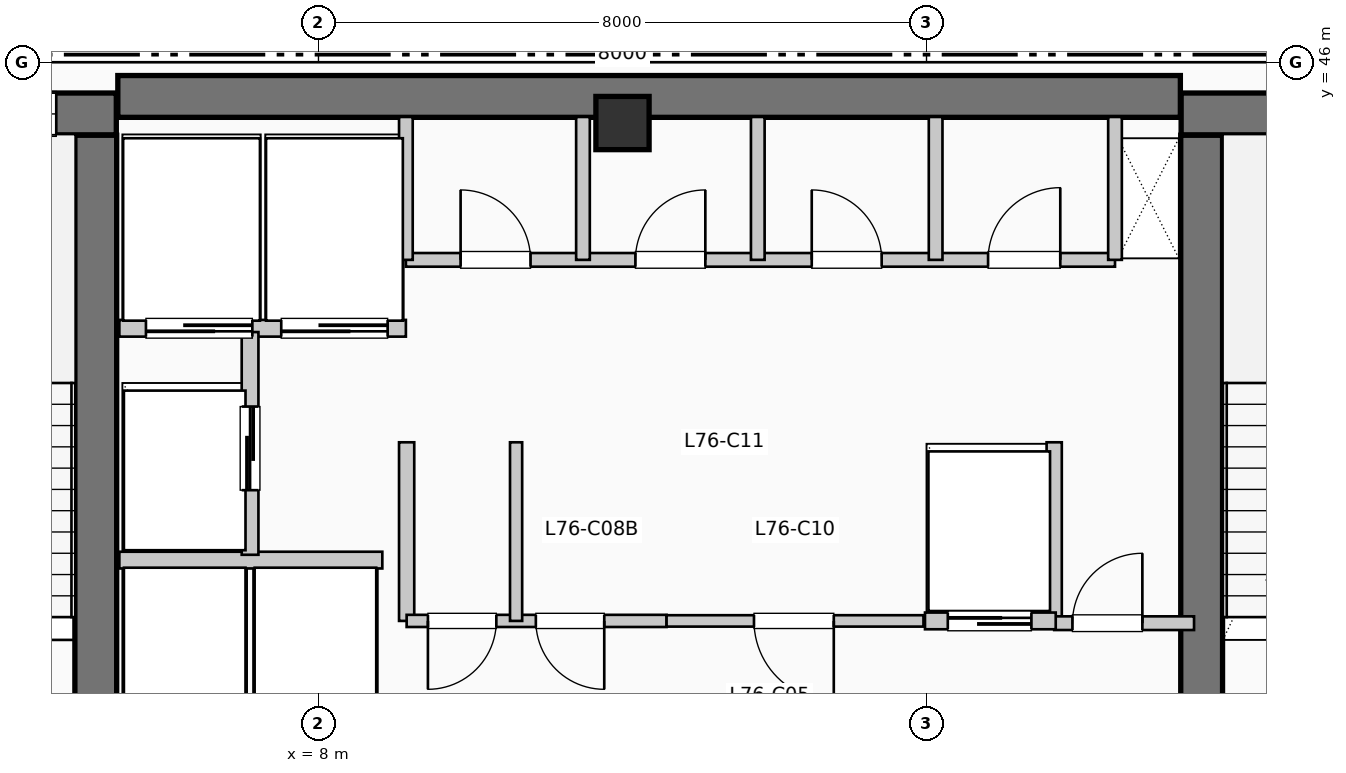
"""IFC4 building model, lengths in metres.
Left out: names, types, materials, properties, quantities, classifications, styles, units other than length and angle.
Written with IfcOpenShell. Run it as: python <this file> out.ifc"""

import sys

from ifc_helpers import new_model, si_unit, direction, frame, frame_2d, origin, origin_2d, place, context, subcontext, project, spatial, rectangle, extrude, element, fill, save


model = new_model("IFC4")
c1 = context("Model", 3, precision=1e-05, world=origin(), true_north=direction((0.0, 1.0)))
c2 = subcontext(c1, "Body", "Model", "MODEL_VIEW")
j1 = project(units=[si_unit("LENGTHUNIT", "METRE"), si_unit("PLANEANGLEUNIT", "RADIAN")], contexts=[c1])
p1 = place(None, origin())
s1 = spatial("IfcSite", under=j1, at=p1, CompositionType="ELEMENT")
p2 = place(p1, origin())
s2 = spatial("IfcBuilding", under=s1, at=p2, CompositionType="ELEMENT")
p3 = place(p2, frame((0.0, 0.0, 311.85)))
s3 = spatial("IfcBuildingStorey", under=s2, at=p3, CompositionType="ELEMENT", Elevation=311.85)
p4 = place(p3, frame((5.36, 45.55, 0.0), z_axis=(0.0, 0.0, 1.0), x_axis=(1.0, 0.0, 0.0)))
e1 = element("IfcWall", 1, at=p4, inside=s3, PredefinedType="SHEAR", context=c2, shape_type="SweptSolid", body=[
    extrude(rectangle(XDim=13.98, YDim=0.55, at=frame_2d((6.99, 0.0))), origin(), (0.0, 0.0, 1.0), 3.96),
])
p5 = place(p3, frame((5.07, 37.15, 0.0), z_axis=(0.0, 0.0, 1.0), x_axis=(0.0, 1.0, 0.0)))
e2 = element("IfcWall", 2, at=p5, inside=s3, PredefinedType="SHEAR", context=c2, shape_type="SweptSolid", body=[
    extrude(rectangle(XDim=7.89, YDim=0.55, at=frame_2d((3.945, 0.0))), origin(), (0.0, 0.0, 1.0), 3.96),
])
p6 = place(p3, frame((1.1, 45.32, 0.0), z_axis=(0.0, 0.0, 1.0), x_axis=(1.0, 0.0, 0.0)))
e3 = element("IfcWall", 3, at=p6, inside=s3, PredefinedType="SHEAR", context=c2, shape_type="SweptSolid", body=[
    extrude(rectangle(XDim=4.24, YDim=0.55, at=frame_2d((2.12, 0.0))), origin(), (0.0, 0.0, 1.0), 3.96),
])
p7 = place(p6, frame((2.05, 0.0, 1.05)))
e4 = element("IfcOpeningElement", 4, at=p7, cuts=e3, PredefinedType="OPENING", context=c2, shape_type="SweptSolid", body=[
    extrude(rectangle(XDim=1.4, YDim=1.8, at=frame_2d((0.7, 0.9))), frame((0.0, 0.285, 0.0), z_axis=(0.0, -1.0, 0.0), x_axis=(1.0, 0.0, 0.0)), (0.0, 0.0, 1.0), 0.57),
])
p8 = place(p3, frame((19.62, 37.15, 0.0), z_axis=(0.0, 0.0, 1.0), x_axis=(0.0, 1.0, 0.0)))
e5 = element("IfcWall", 5, at=p8, inside=s3, PredefinedType="SHEAR", context=c2, shape_type="SweptSolid", body=[
    extrude(rectangle(XDim=7.89, YDim=0.55, at=frame_2d((3.945, 0.0))), origin(), (0.0, 0.0, 1.0), 3.96),
])
p9 = place(p3, frame((19.35, 45.32, 0.0), z_axis=(0.0, 0.0, 1.0), x_axis=(1.0, 0.0, 0.0)))
e6 = element("IfcWall", 6, at=p9, inside=s3, PredefinedType="SHEAR", context=c2, shape_type="SweptSolid", body=[
    extrude(rectangle(XDim=3.69, YDim=0.55, at=frame_2d((1.845, 0.0))), origin(), (0.0, 0.0, 1.0), 3.96),
])
p10 = place(p9, frame((1.15, 0.0, 1.05)))
e7 = element("IfcOpeningElement", 7, at=p10, cuts=e6, PredefinedType="OPENING", context=c2, shape_type="SweptSolid", body=[
    extrude(rectangle(XDim=1.4, YDim=1.8, at=frame_2d((0.7, 0.9))), frame((0.0, 0.285, 0.0), z_axis=(0.0, -1.0, 0.0), x_axis=(1.0, 0.0, 0.0)), (0.0, 0.0, 1.0), 0.57),
])
p11 = place(p3, frame((12.0, 45.2, 0.0), z_axis=(0.0, 0.0, 1.0), x_axis=(1.0, 0.0, 0.0)))
e8 = element("IfcColumn", 8, at=p11, inside=s3, PredefinedType="COLUMN", context=c2, shape_type="SweptSolid", body=[
    extrude(rectangle(XDim=0.7, YDim=0.7, at=origin_2d()), origin(), (0.0, 0.0, 1.0), 3.96),
])
p12 = place(p3, frame((5.38, 39.45, 0.0), z_axis=(0.0, 0.0, 1.0), x_axis=(1.0, 0.0, 0.0)))
e9 = element("IfcWall", 9, at=p12, inside=s3, PredefinedType="PARTITIONING", context=c2, shape_type="SweptSolid", body=[
    extrude(rectangle(XDim=3.46, YDim=0.22, at=frame_2d((1.73, 0.0))), origin(), (0.0, 0.0, 1.0), 3.74),
])
p13 = place(p3, frame((5.38, 42.5, 0.0), z_axis=(0.0, 0.0, 1.0), x_axis=(1.0, 0.0, 0.0)))
e10 = element("IfcWall", 10, at=p13, inside=s3, PredefinedType="PARTITIONING", context=c2, shape_type="SweptSolid", body=[
    extrude(rectangle(XDim=3.77, YDim=0.22, at=frame_2d((1.885, 0.0))), origin(), (0.0, 0.0, 1.0), 3.74),
])
p14 = place(p13, frame((1.75, 0.0, 0.0), z_axis=(0.0, 0.0, 1.0), x_axis=(-1.0, 0.0, 0.0)))
e11 = element("IfcOpeningElement", 11, at=p14, cuts=e10, PredefinedType="OPENING", context=c2, shape_type="SweptSolid", body=[
    extrude(rectangle(XDim=1.4, YDim=2.2, at=frame_2d((0.7, 1.1))), frame((0.0, 0.12, 0.0), z_axis=(0.0, -1.0, 0.0), x_axis=(1.0, 0.0, 0.0)), (0.0, 0.0, 1.0), 0.24),
])
p15 = place(p13, frame((3.53, 0.0, 0.0), z_axis=(0.0, 0.0, 1.0), x_axis=(-1.0, 0.0, 0.0)))
e12 = element("IfcOpeningElement", 12, at=p15, cuts=e10, PredefinedType="OPENING", context=c2, shape_type="SweptSolid", body=[
    extrude(rectangle(XDim=1.4, YDim=2.2, at=frame_2d((0.7, 1.1))), frame((0.0, 0.12, 0.0), z_axis=(0.0, -1.0, 0.0), x_axis=(1.0, 0.0, 0.0)), (0.0, 0.0, 1.0), 0.24),
])
p16 = place(p3, frame((7.1, 39.52, 0.0), z_axis=(0.0, 0.0, 1.0), x_axis=(0.0, 1.0, 0.0)))
e13 = element("IfcWall", 13, at=p16, inside=s3, PredefinedType="PARTITIONING", context=c2, shape_type="SweptSolid", body=[
    extrude(rectangle(XDim=2.93, YDim=0.22, at=frame_2d((1.465, 0.0))), origin(), (0.0, 0.0, 1.0), 3.74),
])
p17 = place(p16, frame((0.85, 0.0, 0.0)))
e14 = element("IfcOpeningElement", 14, at=p17, cuts=e13, PredefinedType="OPENING", context=c2, shape_type="SweptSolid", body=[
    extrude(rectangle(XDim=1.1, YDim=2.2, at=frame_2d((0.55, 1.1))), frame((0.0, 0.12, 0.0), z_axis=(0.0, -1.0, 0.0), x_axis=(1.0, 0.0, 0.0)), (0.0, 0.0, 1.0), 0.24),
])
for number, where, z_axis, x_axis in (
    (15, (9.16, 38.65, 0.0), (0.0, 0.0, 1.0), (0.0, 1.0, 0.0)),
    (16, (17.68, 38.65, 0.0), (0.0, 0.0, 1.0), (0.0, 1.0, 0.0)),
):
    element("IfcWall", number, at=place(p3, frame(where, z_axis=z_axis, x_axis=x_axis)), inside=s3, PredefinedType="PARTITIONING", context=c2, shape_type="SweptSolid", body=[
        extrude(rectangle(XDim=2.35, YDim=0.2, at=frame_2d((1.175, 0.0))), origin(), (0.0, 0.0, 1.0), 3.74),
    ])
p18 = place(p3, frame((17.68, 38.62, 0.0), z_axis=(0.0, 0.0, 1.0), x_axis=(1.0, 0.0, 0.0)))
e17 = element("IfcWall", 17, at=p18, inside=s3, PredefinedType="PARTITIONING", context=c2, shape_type="SweptSolid", body=[
    extrude(rectangle(XDim=1.84, YDim=0.18, at=frame_2d((0.92, 0.0))), origin(), (0.0, 0.0, 1.0), 3.74),
])
p19 = place(p18, frame((0.24, 0.0, 0.0)))
e18 = element("IfcOpeningElement", 18, at=p19, cuts=e17, PredefinedType="OPENING", context=c2, shape_type="SweptSolid", body=[
    extrude(rectangle(XDim=0.92, YDim=2.1, at=frame_2d((0.46, 1.05))), frame((0.0, 0.1, 0.0), z_axis=(0.0, -1.0, 0.0), x_axis=(1.0, 0.0, 0.0)), (0.0, 0.0, 1.0), 0.2),
])
p20 = place(p3, frame((9.16, 38.65, 0.0), z_axis=(0.0, 0.0, 1.0), x_axis=(1.0, 0.0, 0.0)))
e19 = element("IfcWall", 19, at=p20, inside=s3, PredefinedType="PARTITIONING", context=c2, shape_type="SweptSolid", body=[
    extrude(rectangle(XDim=3.42, YDim=0.16, at=frame_2d((1.71, 0.0))), origin(), (0.0, 0.0, 1.0), 3.74),
])
p21 = place(p20, frame((1.18, 0.0, 0.0), z_axis=(0.0, 0.0, 1.0), x_axis=(-1.0, 0.0, 0.0)))
e20 = element("IfcOpeningElement", 20, at=p21, cuts=e19, PredefinedType="OPENING", context=c2, shape_type="SweptSolid", body=[
    extrude(rectangle(XDim=0.9, YDim=2.15, at=frame_2d((0.45, 1.075))), frame((0.0, 0.09, 0.0), z_axis=(0.0, -1.0, 0.0), x_axis=(1.0, 0.0, 0.0)), (0.0, 0.0, 1.0), 0.18),
])
p22 = place(p20, frame((2.6, 0.0, 0.0), z_axis=(0.0, 0.0, 1.0), x_axis=(-1.0, 0.0, 0.0)))
e21 = element("IfcOpeningElement", 21, at=p22, cuts=e19, PredefinedType="OPENING", context=c2, shape_type="SweptSolid", body=[
    extrude(rectangle(XDim=0.9, YDim=2.15, at=frame_2d((0.45, 1.075))), frame((0.0, 0.09, 0.0), z_axis=(0.0, -1.0, 0.0), x_axis=(1.0, 0.0, 0.0)), (0.0, 0.0, 1.0), 0.18),
])
p23 = place(p3, frame((10.6, 38.65, 0.0), z_axis=(0.0, 0.0, 1.0), x_axis=(0.0, 1.0, 0.0)))
e22 = element("IfcWall", 22, at=p23, inside=s3, PredefinedType="PARTITIONING", context=c2, shape_type="SweptSolid", body=[
    extrude(rectangle(XDim=2.35, YDim=0.16, at=frame_2d((1.175, 0.0))), origin(), (0.0, 0.0, 1.0), 3.74),
])
p24 = place(p3, frame((12.58, 38.65, 0.0), z_axis=(0.0, 0.0, 1.0), x_axis=(1.0, 0.0, 0.0)))
e23 = element("IfcWall", 23, at=p24, inside=s3, PredefinedType="PARTITIONING", context=c2, shape_type="SweptSolid", body=[
    extrude(rectangle(XDim=3.38, YDim=0.15, at=frame_2d((1.69, 0.0))), origin(), (0.0, 0.0, 1.0), 3.74),
])
p25 = place(p24, frame((2.2, 0.0, 0.0), z_axis=(0.0, 0.0, 1.0), x_axis=(-1.0, 0.0, 0.0)))
e24 = element("IfcOpeningElement", 24, at=p25, cuts=e23, PredefinedType="OPENING", context=c2, shape_type="SweptSolid", body=[
    extrude(rectangle(XDim=1.05, YDim=2.15, at=frame_2d((0.525, 1.075))), frame((0.0, 0.085, 0.0), z_axis=(0.0, -1.0, 0.0), x_axis=(1.0, 0.0, 0.0)), (0.0, 0.0, 1.0), 0.17),
])
p26 = place(p3, frame((15.98, 38.65, 0.0), z_axis=(0.0, 0.0, 1.0), x_axis=(1.0, 0.0, 0.0)))
e25 = element("IfcWall", 25, at=p26, inside=s3, PredefinedType="PARTITIONING", context=c2, shape_type="SweptSolid", body=[
    extrude(rectangle(XDim=1.72, YDim=0.22, at=frame_2d((0.86, 0.0))), origin(), (0.0, 0.0, 1.0), 3.74),
])
p27 = place(p26, frame((0.3, 0.0, 0.0)))
e26 = element("IfcOpeningElement", 26, at=p27, cuts=e25, PredefinedType="OPENING", context=c2, shape_type="SweptSolid", body=[
    extrude(rectangle(XDim=1.1, YDim=2.2, at=frame_2d((0.55, 1.1))), frame((0.0, 0.12, 0.0), z_axis=(0.0, -1.0, 0.0), x_axis=(1.0, 0.0, 0.0)), (0.0, 0.0, 1.0), 0.24),
])
p28 = place(p3, frame((9.15, 43.4, 0.0), z_axis=(0.0, 0.0, 1.0), x_axis=(1.0, 0.0, 0.0)))
e27 = element("IfcWall", 27, at=p28, inside=s3, PredefinedType="PLUMBINGWALL", context=c2, shape_type="SweptSolid", body=[
    extrude(rectangle(XDim=9.33, YDim=0.18, at=frame_2d((4.665, 0.0))), origin(), (0.0, 0.0, 1.0), 3.74),
])
p29 = place(p28, frame((0.72, 0.0, 0.0)))
e28 = element("IfcOpeningElement", 28, at=p29, cuts=e27, PredefinedType="OPENING", context=c2, shape_type="SweptSolid", body=[
    extrude(rectangle(XDim=0.92, YDim=2.1, at=frame_2d((0.46, 1.05))), frame((0.0, 0.1, 0.0), z_axis=(0.0, -1.0, 0.0), x_axis=(1.0, 0.0, 0.0)), (0.0, 0.0, 1.0), 0.2),
])
p30 = place(p28, frame((3.02, 0.0, 0.0)))
e29 = element("IfcOpeningElement", 29, at=p30, cuts=e27, PredefinedType="OPENING", context=c2, shape_type="SweptSolid", body=[
    extrude(rectangle(XDim=0.92, YDim=2.1, at=frame_2d((0.46, 1.05))), frame((0.0, 0.1, 0.0), z_axis=(0.0, -1.0, 0.0), x_axis=(1.0, 0.0, 0.0)), (0.0, 0.0, 1.0), 0.2),
])
p31 = place(p28, frame((5.34, 0.0, 0.0)))
e30 = element("IfcOpeningElement", 30, at=p31, cuts=e27, PredefinedType="OPENING", context=c2, shape_type="SweptSolid", body=[
    extrude(rectangle(XDim=0.92, YDim=2.1, at=frame_2d((0.46, 1.05))), frame((0.0, 0.1, 0.0), z_axis=(0.0, -1.0, 0.0), x_axis=(1.0, 0.0, 0.0)), (0.0, 0.0, 1.0), 0.2),
])
p32 = place(p28, frame((7.66, 0.0, 0.0)))
e31 = element("IfcOpeningElement", 31, at=p32, cuts=e27, PredefinedType="OPENING", context=c2, shape_type="SweptSolid", body=[
    extrude(rectangle(XDim=0.95, YDim=2.1, at=frame_2d((0.475, 1.05))), frame((0.0, 0.1, 0.0), z_axis=(0.0, -1.0, 0.0), x_axis=(1.0, 0.0, 0.0)), (0.0, 0.0, 1.0), 0.2),
])
for number, where, z_axis, x_axis in (
    (32, (9.15, 43.4, 0.0), (0.0, 0.0, 1.0), (0.0, 1.0, 0.0)),
    (33, (18.48, 43.4, 0.0), (0.0, 0.0, 1.0), (0.0, 1.0, 0.0)),
    (34, (11.48, 43.4, 0.0), (0.0, 0.0, 1.0), (0.0, 1.0, 0.0)),
    (35, (13.78, 43.4, 0.0), (0.0, 0.0, 1.0), (0.0, 1.0, 0.0)),
    (36, (16.12, 43.4, 0.0), (0.0, 0.0, 1.0), (0.0, 1.0, 0.0)),
):
    element("IfcWall", number, at=place(p3, frame(where, z_axis=z_axis, x_axis=x_axis)), inside=s3, PredefinedType="PLUMBINGWALL", context=c2, shape_type="SweptSolid", body=[
        extrude(rectangle(XDim=1.88, YDim=0.18, at=frame_2d((0.94, 0.0))), origin(), (0.0, 0.0, 1.0), 3.74),
    ])
p33 = place(p7, origin())
e37 = element("IfcWindow", 37, at=p33, inside=s3, PartitioningType="SINGLE_PANEL", PredefinedType="WINDOW", context=c2, shape_type="SweptSolid", body=[
    extrude(rectangle(XDim=1.4, YDim=1.8, at=frame_2d((0.7, 0.9))), frame((0.0, 0.03, 0.0), z_axis=(0.0, -1.0, 0.0), x_axis=(1.0, 0.0, 0.0)), (0.0, 0.0, 1.0), 0.06),
])
fill(e4, e37)
p34 = place(p14, origin())
e38 = element("IfcDoor", 38, at=p34, inside=s3, OperationType="SLIDING_TO_LEFT", PredefinedType="DOOR", context=c2, shape_type="SweptSolid", body=[
    extrude(rectangle(XDim=1.4, YDim=2.2, at=frame_2d((0.7, 1.1))), frame((0.0, 0.025, 0.0), z_axis=(0.0, -1.0, 0.0), x_axis=(1.0, 0.0, 0.0)), (0.0, 0.0, 1.0), 0.05),
])
fill(e11, e38)
p35 = place(p15, origin())
e39 = element("IfcDoor", 39, at=p35, inside=s3, OperationType="SLIDING_TO_LEFT", PredefinedType="DOOR", context=c2, shape_type="SweptSolid", body=[
    extrude(rectangle(XDim=1.4, YDim=2.2, at=frame_2d((0.7, 1.1))), frame((0.0, 0.025, 0.0), z_axis=(0.0, -1.0, 0.0), x_axis=(1.0, 0.0, 0.0)), (0.0, 0.0, 1.0), 0.05),
])
fill(e12, e39)
p36 = place(p17, origin())
e40 = element("IfcDoor", 40, at=p36, inside=s3, OperationType="SLIDING_TO_LEFT", PredefinedType="DOOR", context=c2, shape_type="SweptSolid", body=[
    extrude(rectangle(XDim=1.1, YDim=2.2, at=frame_2d((0.55, 1.1))), frame((0.0, 0.025, 0.0), z_axis=(0.0, -1.0, 0.0), x_axis=(1.0, 0.0, 0.0)), (0.0, 0.0, 1.0), 0.05),
])
fill(e14, e40)
p37 = place(p19, origin())
e41 = element("IfcDoor", 41, at=p37, inside=s3, OperationType="SINGLE_SWING_RIGHT", PredefinedType="DOOR", context=c2, shape_type="SweptSolid", body=[
    extrude(rectangle(XDim=0.92, YDim=2.1, at=frame_2d((0.46, 1.05))), frame((0.0, 0.025, 0.0), z_axis=(0.0, -1.0, 0.0), x_axis=(1.0, 0.0, 0.0)), (0.0, 0.0, 1.0), 0.05),
])
fill(e18, e41)
p38 = place(p21, origin())
e42 = element("IfcDoor", 42, at=p38, inside=s3, OperationType="SINGLE_SWING_LEFT", PredefinedType="DOOR", context=c2, shape_type="SweptSolid", body=[
    extrude(rectangle(XDim=0.9, YDim=2.15, at=frame_2d((0.45, 1.075))), frame((0.0, 0.025, 0.0), z_axis=(0.0, -1.0, 0.0), x_axis=(1.0, 0.0, 0.0)), (0.0, 0.0, 1.0), 0.05),
])
fill(e20, e42)
p39 = place(p22, origin())
e43 = element("IfcDoor", 43, at=p39, inside=s3, OperationType="SINGLE_SWING_RIGHT", PredefinedType="DOOR", context=c2, shape_type="SweptSolid", body=[
    extrude(rectangle(XDim=0.9, YDim=2.15, at=frame_2d((0.45, 1.075))), frame((0.0, 0.025, 0.0), z_axis=(0.0, -1.0, 0.0), x_axis=(1.0, 0.0, 0.0)), (0.0, 0.0, 1.0), 0.05),
])
fill(e21, e43)
p40 = place(p25, origin())
e44 = element("IfcDoor", 44, at=p40, inside=s3, OperationType="SINGLE_SWING_RIGHT", PredefinedType="DOOR", context=c2, shape_type="SweptSolid", body=[
    extrude(rectangle(XDim=1.05, YDim=2.15, at=frame_2d((0.525, 1.075))), frame((0.0, 0.025, 0.0), z_axis=(0.0, -1.0, 0.0), x_axis=(1.0, 0.0, 0.0)), (0.0, 0.0, 1.0), 0.05),
])
fill(e24, e44)
p41 = place(p27, origin())
e45 = element("IfcDoor", 45, at=p41, inside=s3, OperationType="SLIDING_TO_LEFT", PredefinedType="DOOR", context=c2, shape_type="SweptSolid", body=[
    extrude(rectangle(XDim=1.1, YDim=2.2, at=frame_2d((0.55, 1.1))), frame((0.0, 0.025, 0.0), z_axis=(0.0, -1.0, 0.0), x_axis=(1.0, 0.0, 0.0)), (0.0, 0.0, 1.0), 0.05),
])
fill(e26, e45)
p42 = place(p29, origin())
e46 = element("IfcDoor", 46, at=p42, inside=s3, OperationType="SINGLE_SWING_LEFT", PredefinedType="DOOR", context=c2, shape_type="SweptSolid", body=[
    extrude(rectangle(XDim=0.92, YDim=2.1, at=frame_2d((0.46, 1.05))), frame((0.0, 0.025, 0.0), z_axis=(0.0, -1.0, 0.0), x_axis=(1.0, 0.0, 0.0)), (0.0, 0.0, 1.0), 0.05),
])
fill(e28, e46)
p43 = place(p30, origin())
e47 = element("IfcDoor", 47, at=p43, inside=s3, OperationType="SINGLE_SWING_RIGHT", PredefinedType="DOOR", context=c2, shape_type="SweptSolid", body=[
    extrude(rectangle(XDim=0.92, YDim=2.1, at=frame_2d((0.46, 1.05))), frame((0.0, 0.025, 0.0), z_axis=(0.0, -1.0, 0.0), x_axis=(1.0, 0.0, 0.0)), (0.0, 0.0, 1.0), 0.05),
])
fill(e29, e47)
p44 = place(p31, origin())
e48 = element("IfcDoor", 48, at=p44, inside=s3, OperationType="SINGLE_SWING_LEFT", PredefinedType="DOOR", context=c2, shape_type="SweptSolid", body=[
    extrude(rectangle(XDim=0.92, YDim=2.1, at=frame_2d((0.46, 1.05))), frame((0.0, 0.025, 0.0), z_axis=(0.0, -1.0, 0.0), x_axis=(1.0, 0.0, 0.0)), (0.0, 0.0, 1.0), 0.05),
])
fill(e30, e48)
p45 = place(p32, origin())
e49 = element("IfcDoor", 49, at=p45, inside=s3, OperationType="SINGLE_SWING_RIGHT", PredefinedType="DOOR", context=c2, shape_type="SweptSolid", body=[
    extrude(rectangle(XDim=0.95, YDim=2.1, at=frame_2d((0.475, 1.05))), frame((0.0, 0.025, 0.0), z_axis=(0.0, -1.0, 0.0), x_axis=(1.0, 0.0, 0.0)), (0.0, 0.0, 1.0), 0.05),
])
fill(e31, e49)
save(model, sys.argv[1])
